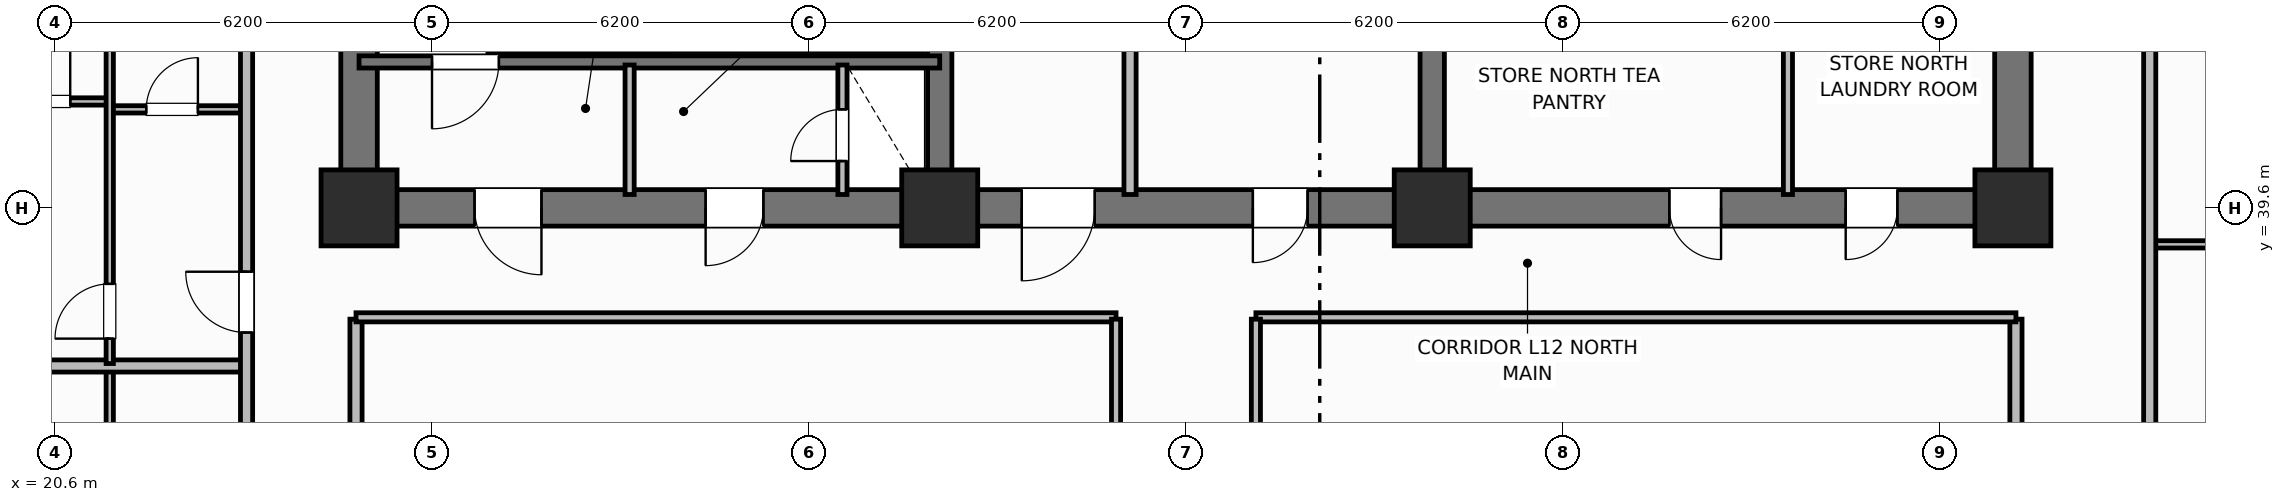
"""IFC4 building model, lengths in metres.
Left out: names, types, materials, properties, quantities, classifications, styles, units other than length and angle.
Written with IfcOpenShell. Run it as: python <this file> out.ifc"""

import sys

from ifc_helpers import new_model, si_unit, direction, frame, frame_2d, origin, origin_2d, place, context, subcontext, project, spatial, rectangle, extrude, element, fill, save


model = new_model("IFC4")
c1 = context("Model", 3, precision=1e-05, world=origin(), true_north=direction((0.0, 1.0)))
c2 = subcontext(c1, "Body", "Model", "MODEL_VIEW")
j1 = project(units=[si_unit("LENGTHUNIT", "METRE"), si_unit("PLANEANGLEUNIT", "RADIAN")], contexts=[c1])
p1 = place(None, origin())
s1 = spatial("IfcSite", under=j1, at=p1, CompositionType="ELEMENT")
p2 = place(p1, origin())
s2 = spatial("IfcBuilding", under=s1, at=p2, CompositionType="ELEMENT")
p3 = place(p2, frame((0.0, 0.0, 51.0)))
s3 = spatial("IfcBuildingStorey", under=s2, at=p3, CompositionType="ELEMENT", Elevation=51.0)
for number, where, z_axis, x_axis in (
    (1, (25.6, 39.9, 0.0), (0.0, 0.0, 1.0), (0.0, 1.0, 0.0)),
    (2, (52.8, 39.9, 0.0), (0.0, 0.0, 1.0), (0.0, 1.0, 0.0)),
):
    element("IfcWall", number, at=place(p3, frame(where, z_axis=z_axis, x_axis=x_axis)), inside=s3, PredefinedType="SHEAR", context=c2, shape_type="SweptSolid", body=[
        extrude(rectangle(XDim=5.6, YDim=0.6, at=frame_2d((2.8, 0.0))), origin(), (0.0, 0.0, 1.0), 3.7),
    ])
p4 = place(p3, frame((52.8, 39.6, 0.0), z_axis=(0.0, 0.0, 1.0), x_axis=(-1.0, 0.0, 0.0)))
e3 = element("IfcWall", 3, at=p4, inside=s3, PredefinedType="SHEAR", context=c2, shape_type="SweptSolid", body=[
    extrude(rectangle(XDim=27.2, YDim=0.6, at=frame_2d((13.6, 0.0))), origin(), (0.0, 0.0, 1.0), 3.7),
])
p5 = place(p4, frame((24.2, 0.0, 0.0)))
e4 = element("IfcOpeningElement", 4, at=p5, cuts=e3, PredefinedType="OPENING", context=c2, shape_type="SweptSolid", body=[
    extrude(rectangle(XDim=1.1, YDim=2.15, at=frame_2d((0.55, 1.075))), frame((0.0, 0.31, 0.0), z_axis=(0.0, -1.0, 0.0), x_axis=(1.0, 0.0, 0.0)), (0.0, 0.0, 1.0), 0.62),
])
p6 = place(p4, frame((20.55, 0.0, 0.0)))
e5 = element("IfcOpeningElement", 5, at=p6, cuts=e3, PredefinedType="OPENING", context=c2, shape_type="SweptSolid", body=[
    extrude(rectangle(XDim=0.95, YDim=2.1, at=frame_2d((0.475, 1.05))), frame((0.0, 0.31, 0.0), z_axis=(0.0, -1.0, 0.0), x_axis=(1.0, 0.0, 0.0)), (0.0, 0.0, 1.0), 0.62),
])
p7 = place(p4, frame((15.1, 0.0, 0.0)))
e6 = element("IfcOpeningElement", 6, at=p7, cuts=e3, PredefinedType="OPENING", context=c2, shape_type="SweptSolid", body=[
    extrude(rectangle(XDim=1.2, YDim=2.15, at=frame_2d((0.6, 1.075))), frame((0.0, 0.31, 0.0), z_axis=(0.0, -1.0, 0.0), x_axis=(1.0, 0.0, 0.0)), (0.0, 0.0, 1.0), 0.62),
])
p8 = place(p4, frame((11.6, 0.0, 0.0)))
e7 = element("IfcOpeningElement", 7, at=p8, cuts=e3, PredefinedType="OPENING", context=c2, shape_type="SweptSolid", body=[
    extrude(rectangle(XDim=0.9, YDim=2.1, at=frame_2d((0.45, 1.05))), frame((0.0, 0.31, 0.0), z_axis=(0.0, -1.0, 0.0), x_axis=(1.0, 0.0, 0.0)), (0.0, 0.0, 1.0), 0.62),
])
p9 = place(p4, frame((4.8, 0.0, 0.0)))
e8 = element("IfcOpeningElement", 8, at=p9, cuts=e3, PredefinedType="OPENING", context=c2, shape_type="SweptSolid", body=[
    extrude(rectangle(XDim=0.85, YDim=2.1, at=frame_2d((0.425, 1.05))), frame((0.0, 0.31, 0.0), z_axis=(0.0, -1.0, 0.0), x_axis=(1.0, 0.0, 0.0)), (0.0, 0.0, 1.0), 0.62),
])
p10 = place(p4, frame((1.9, 0.0, 0.0)))
e9 = element("IfcOpeningElement", 9, at=p10, cuts=e3, PredefinedType="OPENING", context=c2, shape_type="SweptSolid", body=[
    extrude(rectangle(XDim=0.85, YDim=2.1, at=frame_2d((0.425, 1.05))), frame((0.0, 0.31, 0.0), z_axis=(0.0, -1.0, 0.0), x_axis=(1.0, 0.0, 0.0)), (0.0, 0.0, 1.0), 0.62),
])
for number, where, z_axis, x_axis in (
    (10, (35.15, 39.9, 0.0), (0.0, 0.0, 1.0), (0.0, 1.0, 0.0)),
    (11, (43.25, 39.9, 0.0), (0.0, 0.0, 1.0), (0.0, 1.0, 0.0)),
):
    element("IfcWall", number, at=place(p3, frame(where, z_axis=z_axis, x_axis=x_axis)), inside=s3, PredefinedType="SHEAR", context=c2, shape_type="SweptSolid", body=[
        extrude(rectangle(XDim=5.6, YDim=0.4, at=frame_2d((2.8, 0.0))), origin(), (0.0, 0.0, 1.0), 3.7),
    ])
for number, where, z_axis, x_axis in (
    (12, (25.6, 39.6, 0.0), (0.0, 0.0, 1.0), (1.0, 0.0, 0.0)),
    (13, (35.15, 39.6, 0.0), (0.0, 0.0, 1.0), (1.0, 0.0, 0.0)),
    (14, (43.25, 39.6, 0.0), (0.0, 0.0, 1.0), (1.0, 0.0, 0.0)),
    (15, (52.8, 39.6, 0.0), (0.0, 0.0, 1.0), (1.0, 0.0, 0.0)),
):
    element("IfcColumn", number, at=place(p3, frame(where, z_axis=z_axis, x_axis=x_axis)), inside=s3, PredefinedType="COLUMN", context=c2, shape_type="SweptSolid", body=[
        extrude(rectangle(XDim=1.25, YDim=1.25, at=origin_2d()), origin(), (0.0, 0.0, 1.0), 3.7),
    ])
p11 = place(p3, frame((35.15, 42.0, 0.0), z_axis=(0.0, 0.0, 1.0), x_axis=(-1.0, 0.0, 0.0)))
e16 = element("IfcWall", 16, at=p11, inside=s3, PredefinedType="SHEAR", context=c2, shape_type="SweptSolid", body=[
    extrude(rectangle(XDim=9.55, YDim=0.2, at=frame_2d((4.775, 0.0))), origin(), (0.0, 0.0, 1.0), 3.7),
])
p12 = place(p11, frame((7.25, 0.0, 0.0)))
e17 = element("IfcOpeningElement", 17, at=p12, cuts=e16, PredefinedType="OPENING", context=c2, shape_type="SweptSolid", body=[
    extrude(rectangle(XDim=1.1, YDim=2.15, at=frame_2d((0.55, 1.075))), frame((0.0, 0.11, 0.0), z_axis=(0.0, -1.0, 0.0), x_axis=(1.0, 0.0, 0.0)), (0.0, 0.0, 1.0), 0.22),
])
p13 = place(p3, frame((33.55, 39.82, 0.0), z_axis=(0.0, 0.0, 1.0), x_axis=(0.0, 1.0, 0.0)))
e18 = element("IfcWall", 18, at=p13, inside=s3, PredefinedType="PARTITIONING", context=c2, shape_type="SweptSolid", body=[
    extrude(rectangle(XDim=2.13, YDim=0.15, at=frame_2d((1.065, 0.0))), origin(), (0.0, 0.0, 1.0), 2.53),
])
p14 = place(p13, frame((0.55, 0.0, 0.0)))
e19 = element("IfcOpeningElement", 19, at=p14, cuts=e18, PredefinedType="OPENING", context=c2, shape_type="SweptSolid", body=[
    extrude(rectangle(XDim=0.85, YDim=2.05, at=frame_2d((0.425, 1.025))), frame((0.0, 0.085, 0.0), z_axis=(0.0, -1.0, 0.0), x_axis=(1.0, 0.0, 0.0)), (0.0, 0.0, 1.0), 0.17),
])
p15 = place(p3, frame((30.05, 39.82, 0.0), z_axis=(0.0, 0.0, 1.0), x_axis=(0.0, 1.0, 0.0)))
e20 = element("IfcWall", 20, at=p15, inside=s3, PredefinedType="PARTITIONING", context=c2, shape_type="SweptSolid", body=[
    extrude(rectangle(XDim=2.13, YDim=0.15, at=frame_2d((1.065, 0.0))), origin(), (0.0, 0.0, 1.0), 2.53),
])
p16 = place(p3, frame((38.28, 39.82, 0.0), z_axis=(0.0, 0.0, 1.0), x_axis=(0.0, 1.0, 0.0)))
e21 = element("IfcWall", 21, at=p16, inside=s3, PredefinedType="PARTITIONING", context=c2, shape_type="SweptSolid", body=[
    extrude(rectangle(XDim=2.73, YDim=0.2, at=frame_2d((1.365, 0.0))), origin(), (0.0, 0.0, 1.0), 2.53),
])
p17 = place(p3, frame((49.1, 39.82, 0.0), z_axis=(0.0, 0.0, 1.0), x_axis=(0.0, 1.0, 0.0)))
e22 = element("IfcWall", 22, at=p17, inside=s3, PredefinedType="PARTITIONING", context=c2, shape_type="SweptSolid", body=[
    extrude(rectangle(XDim=2.73, YDim=0.15, at=frame_2d((1.365, 0.0))), origin(), (0.0, 0.0, 1.0), 2.53),
])
for number, where, z_axis, x_axis in (
    (23, (25.55, 18.63, 0.0), (0.0, 0.0, 1.0), (0.0, 1.0, 0.0)),
    (24, (52.85, 18.63, 0.0), (0.0, 0.0, 1.0), (0.0, 1.0, 0.0)),
):
    element("IfcWall", number, at=place(p3, frame(where, z_axis=z_axis, x_axis=x_axis)), inside=s3, PredefinedType="PARTITIONING", context=c2, shape_type="SweptSolid", body=[
        extrude(rectangle(XDim=19.14, YDim=0.2, at=frame_2d((9.57, 0.0))), origin(), (0.0, 0.0, 1.0), 2.53),
    ])
for number, where, z_axis, x_axis in (
    (25, (25.55, 37.8, 0.0), (0.0, 0.0, 1.0), (1.0, 0.0, 0.0)),
    (26, (40.35, 37.8, 0.0), (0.0, 0.0, 1.0), (1.0, 0.0, 0.0)),
):
    element("IfcWall", number, at=place(p3, frame(where, z_axis=z_axis, x_axis=x_axis)), inside=s3, PredefinedType="PARTITIONING", context=c2, shape_type="SweptSolid", body=[
        extrude(rectangle(XDim=12.5, YDim=0.15, at=frame_2d((6.25, 0.0))), origin(), (0.0, 0.0, 1.0), 2.53),
    ])
p18 = place(p3, frame((38.05, 18.63, 0.0), z_axis=(0.0, 0.0, 1.0), x_axis=(0.0, 1.0, 0.0)))
e27 = element("IfcWall", 27, at=p18, inside=s3, PredefinedType="PARTITIONING", context=c2, shape_type="SweptSolid", body=[
    extrude(rectangle(XDim=19.14, YDim=0.15, at=frame_2d((9.57, 0.0))), origin(), (0.0, 0.0, 1.0), 2.53),
])
p19 = place(p18, frame((2.2, 0.0, 0.0)))
e28 = element("IfcOpeningElement", 28, at=p19, cuts=e27, PredefinedType="OPENING", context=c2, shape_type="SweptSolid", body=[
    extrude(rectangle(XDim=1.0, YDim=2.15, at=frame_2d((0.5, 1.075))), frame((0.0, 0.085, 0.0), z_axis=(0.0, -1.0, 0.0), x_axis=(1.0, 0.0, 0.0)), (0.0, 0.0, 1.0), 0.17),
])
p20 = place(p18, frame((10.604, 0.0, 0.0)))
e29 = element("IfcOpeningElement", 29, at=p20, cuts=e27, PredefinedType="OPENING", context=c2, shape_type="SweptSolid", body=[
    extrude(rectangle(XDim=1.0, YDim=2.15, at=frame_2d((0.5, 1.075))), frame((0.0, 0.085, 0.0), z_axis=(0.0, -1.0, 0.0), x_axis=(1.0, 0.0, 0.0)), (0.0, 0.0, 1.0), 0.17),
])
p21 = place(p3, frame((40.35, 18.63, 0.0), z_axis=(0.0, 0.0, 1.0), x_axis=(0.0, 1.0, 0.0)))
e30 = element("IfcWall", 30, at=p21, inside=s3, PredefinedType="PARTITIONING", context=c2, shape_type="SweptSolid", body=[
    extrude(rectangle(XDim=19.14, YDim=0.15, at=frame_2d((9.57, 0.0))), origin(), (0.0, 0.0, 1.0), 2.53),
])
p22 = place(p21, frame((2.2, 0.0, 0.0)))
e31 = element("IfcOpeningElement", 31, at=p22, cuts=e30, PredefinedType="OPENING", context=c2, shape_type="SweptSolid", body=[
    extrude(rectangle(XDim=1.0, YDim=2.15, at=frame_2d((0.5, 1.075))), frame((0.0, 0.085, 0.0), z_axis=(0.0, -1.0, 0.0), x_axis=(1.0, 0.0, 0.0)), (0.0, 0.0, 1.0), 0.17),
])
p23 = place(p21, frame((10.604, 0.0, 0.0)))
e32 = element("IfcOpeningElement", 32, at=p23, cuts=e30, PredefinedType="OPENING", context=c2, shape_type="SweptSolid", body=[
    extrude(rectangle(XDim=0.9, YDim=2.1, at=frame_2d((0.45, 1.05))), frame((0.0, 0.085, 0.0), z_axis=(0.0, -1.0, 0.0), x_axis=(1.0, 0.0, 0.0)), (0.0, 0.0, 1.0), 0.17),
])
p24 = place(p3, frame((21.5, 26.64, 0.0), z_axis=(0.0, 0.0, 1.0), x_axis=(0.0, 1.0, 0.0)))
e33 = element("IfcWall", 33, at=p24, inside=s3, PredefinedType="PARTITIONING", context=c2, shape_type="SweptSolid", body=[
    extrude(rectangle(XDim=10.32, YDim=0.12, at=frame_2d((5.16, 0.0))), origin(), (0.0, 0.0, 1.0), 2.53),
])
p25 = place(p24, frame((2.81, 0.0, 0.0)))
e34 = element("IfcOpeningElement", 34, at=p25, cuts=e33, PredefinedType="OPENING", context=c2, shape_type="SweptSolid", body=[
    extrude(rectangle(XDim=0.9, YDim=2.1, at=frame_2d((0.45, 1.05))), frame((0.0, 0.07, 0.0), z_axis=(0.0, -1.0, 0.0), x_axis=(1.0, 0.0, 0.0)), (0.0, 0.0, 1.0), 0.14),
])
p26 = place(p3, frame((14.57, 37.0, 0.0), z_axis=(0.0, 0.0, 1.0), x_axis=(1.0, 0.0, 0.0)))
e35 = element("IfcWall", 35, at=p26, inside=s3, PredefinedType="PARTITIONING", context=c2, shape_type="SweptSolid", body=[
    extrude(rectangle(XDim=9.18, YDim=0.2, at=frame_2d((4.59, 0.0))), origin(), (0.0, 0.0, 1.0), 2.53),
])
p27 = place(p3, frame((21.5, 41.22, 0.0), z_axis=(0.0, 0.0, 1.0), x_axis=(1.0, 0.0, 0.0)))
e36 = element("IfcWall", 36, at=p27, inside=s3, PredefinedType="PARTITIONING", context=c2, shape_type="SweptSolid", body=[
    extrude(rectangle(XDim=2.25, YDim=0.12, at=frame_2d((1.125, 0.0))), origin(), (0.0, 0.0, 1.0), 2.53),
])
p28 = place(p27, frame((0.6, 0.0, 0.0)))
e37 = element("IfcOpeningElement", 37, at=p28, cuts=e36, PredefinedType="OPENING", context=c2, shape_type="SweptSolid", body=[
    extrude(rectangle(XDim=0.85, YDim=2.1, at=frame_2d((0.425, 1.05))), frame((0.0, 0.07, 0.0), z_axis=(0.0, -1.0, 0.0), x_axis=(1.0, 0.0, 0.0)), (0.0, 0.0, 1.0), 0.14),
])
p29 = place(p3, frame((14.57, 41.35, 0.0), z_axis=(0.0, 0.0, 1.0), x_axis=(1.0, 0.0, 0.0)))
e38 = element("IfcWall", 38, at=p29, inside=s3, PredefinedType="PARTITIONING", context=c2, shape_type="SweptSolid", body=[
    extrude(rectangle(XDim=6.93, YDim=0.12, at=frame_2d((3.465, 0.0))), origin(), (0.0, 0.0, 1.0), 2.53),
])
p30 = place(p29, frame((5.38, 0.0, 0.0)))
e39 = element("IfcOpeningElement", 39, at=p30, cuts=e38, PredefinedType="OPENING", context=c2, shape_type="SweptSolid", body=[
    extrude(rectangle(XDim=0.9, YDim=2.1, at=frame_2d((0.45, 1.05))), frame((0.0, 0.07, 0.0), z_axis=(0.0, -1.0, 0.0), x_axis=(1.0, 0.0, 0.0)), (0.0, 0.0, 1.0), 0.14),
])
p31 = place(p3, frame((21.5, 37.04, 0.0), z_axis=(0.0, 0.0, 1.0), x_axis=(0.0, 1.0, 0.0)))
e40 = element("IfcWall", 40, at=p31, inside=s3, PredefinedType="PARTITIONING", context=c2, shape_type="SweptSolid", body=[
    extrude(rectangle(XDim=8.72, YDim=0.12, at=frame_2d((4.36, 0.0))), origin(), (0.0, 0.0, 1.0), 2.53),
])
p32 = place(p31, frame((0.41, 0.0, 0.0)))
e41 = element("IfcOpeningElement", 41, at=p32, cuts=e40, PredefinedType="OPENING", context=c2, shape_type="SweptSolid", body=[
    extrude(rectangle(XDim=0.9, YDim=2.1, at=frame_2d((0.45, 1.05))), frame((0.0, 0.07, 0.0), z_axis=(0.0, -1.0, 0.0), x_axis=(1.0, 0.0, 0.0)), (0.0, 0.0, 1.0), 0.14),
])
p33 = place(p3, frame((23.75, 10.6, 0.0), z_axis=(0.0, 0.0, 1.0), x_axis=(0.0, 1.0, 0.0)))
e42 = element("IfcWall", 42, at=p33, inside=s3, PredefinedType="PARTITIONING", context=c2, shape_type="SweptSolid", body=[
    extrude(rectangle(XDim=35.2, YDim=0.2, at=frame_2d((17.6, 0.0))), origin(), (0.0, 0.0, 1.0), 2.53),
])
p34 = place(p33, frame((2.65, 0.0, 0.0)))
e43 = element("IfcOpeningElement", 43, at=p34, cuts=e42, PredefinedType="OPENING", context=c2, shape_type="SweptSolid", body=[
    extrude(rectangle(XDim=1.0, YDim=2.15, at=frame_2d((0.5, 1.075))), frame((0.0, 0.11, 0.0), z_axis=(0.0, -1.0, 0.0), x_axis=(1.0, 0.0, 0.0)), (0.0, 0.0, 1.0), 0.22),
])
p35 = place(p33, frame((10.81, 0.0, 0.0)))
e44 = element("IfcOpeningElement", 44, at=p35, cuts=e42, PredefinedType="OPENING", context=c2, shape_type="SweptSolid", body=[
    extrude(rectangle(XDim=1.0, YDim=2.15, at=frame_2d((0.5, 1.075))), frame((0.0, 0.11, 0.0), z_axis=(0.0, -1.0, 0.0), x_axis=(1.0, 0.0, 0.0)), (0.0, 0.0, 1.0), 0.22),
])
p36 = place(p33, frame((19.54, 0.0, 0.0)))
e45 = element("IfcOpeningElement", 45, at=p36, cuts=e42, PredefinedType="OPENING", context=c2, shape_type="SweptSolid", body=[
    extrude(rectangle(XDim=1.0, YDim=2.15, at=frame_2d((0.5, 1.075))), frame((0.0, 0.11, 0.0), z_axis=(0.0, -1.0, 0.0), x_axis=(1.0, 0.0, 0.0)), (0.0, 0.0, 1.0), 0.22),
])
p37 = place(p33, frame((26.95, 0.0, 0.0)))
e46 = element("IfcOpeningElement", 46, at=p37, cuts=e42, PredefinedType="OPENING", context=c2, shape_type="SweptSolid", body=[
    extrude(rectangle(XDim=1.0, YDim=2.15, at=frame_2d((0.5, 1.075))), frame((0.0, 0.11, 0.0), z_axis=(0.0, -1.0, 0.0), x_axis=(1.0, 0.0, 0.0)), (0.0, 0.0, 1.0), 0.22),
])
p38 = place(p3, frame((55.05, 39.0, 0.0), z_axis=(0.0, 0.0, 1.0), x_axis=(1.0, 0.0, 0.0)))
e47 = element("IfcWall", 47, at=p38, inside=s3, PredefinedType="PARTITIONING", context=c2, shape_type="SweptSolid", body=[
    extrude(rectangle(XDim=2.25, YDim=0.12, at=frame_2d((1.125, 0.0))), origin(), (0.0, 0.0, 1.0), 2.53),
])
p39 = place(p3, frame((55.05, 10.6, 0.0), z_axis=(0.0, 0.0, 1.0), x_axis=(0.0, 1.0, 0.0)))
e48 = element("IfcWall", 48, at=p39, inside=s3, PredefinedType="PARTITIONING", context=c2, shape_type="SweptSolid", body=[
    extrude(rectangle(XDim=35.2, YDim=0.2, at=frame_2d((17.6, 0.0))), origin(), (0.0, 0.0, 1.0), 2.53),
])
p40 = place(p39, frame((2.65, 0.0, 0.0)))
e49 = element("IfcOpeningElement", 49, at=p40, cuts=e48, PredefinedType="OPENING", context=c2, shape_type="SweptSolid", body=[
    extrude(rectangle(XDim=1.0, YDim=2.15, at=frame_2d((0.5, 1.075))), frame((0.0, 0.11, 0.0), z_axis=(0.0, -1.0, 0.0), x_axis=(1.0, 0.0, 0.0)), (0.0, 0.0, 1.0), 0.22),
])
p41 = place(p39, frame((22.75, 0.0, 0.0)))
e50 = element("IfcOpeningElement", 50, at=p41, cuts=e48, PredefinedType="OPENING", context=c2, shape_type="SweptSolid", body=[
    extrude(rectangle(XDim=1.0, YDim=2.15, at=frame_2d((0.5, 1.075))), frame((0.0, 0.11, 0.0), z_axis=(0.0, -1.0, 0.0), x_axis=(1.0, 0.0, 0.0)), (0.0, 0.0, 1.0), 0.22),
])
p42 = place(p12, origin())
e51 = element("IfcDoor", 51, at=p42, inside=s3, OperationType="SINGLE_SWING_RIGHT", PredefinedType="DOOR", context=c2, shape_type="SweptSolid", body=[
    extrude(rectangle(XDim=1.1, YDim=2.15, at=frame_2d((0.55, 1.075))), frame((0.0, 0.025, 0.0), z_axis=(0.0, -1.0, 0.0), x_axis=(1.0, 0.0, 0.0)), (0.0, 0.0, 1.0), 0.05),
])
fill(e17, e51)
p43 = place(p14, origin())
e52 = element("IfcDoor", 52, at=p43, inside=s3, OperationType="SINGLE_SWING_LEFT", PredefinedType="TRAPDOOR", context=c2, shape_type="SweptSolid", body=[
    extrude(rectangle(XDim=0.85, YDim=2.05, at=frame_2d((0.425, 1.025))), frame((0.0, 0.025, 0.0), z_axis=(0.0, -1.0, 0.0), x_axis=(1.0, 0.0, 0.0)), (0.0, 0.0, 1.0), 0.05),
])
fill(e19, e52)
p44 = place(p28, origin())
e53 = element("IfcDoor", 53, at=p44, inside=s3, OperationType="SINGLE_SWING_RIGHT", PredefinedType="DOOR", context=c2, shape_type="SweptSolid", body=[
    extrude(rectangle(XDim=0.85, YDim=2.1, at=frame_2d((0.425, 1.05))), frame((0.0, 0.025, 0.0), z_axis=(0.0, -1.0, 0.0), x_axis=(1.0, 0.0, 0.0)), (0.0, 0.0, 1.0), 0.05),
])
fill(e37, e53)
p45 = place(p30, origin())
e54 = element("IfcDoor", 54, at=p45, inside=s3, OperationType="SINGLE_SWING_RIGHT", PredefinedType="DOOR", context=c2, shape_type="SweptSolid", body=[
    extrude(rectangle(XDim=0.9, YDim=2.1, at=frame_2d((0.45, 1.05))), frame((0.0, 0.025, 0.0), z_axis=(0.0, -1.0, 0.0), x_axis=(1.0, 0.0, 0.0)), (0.0, 0.0, 1.0), 0.05),
])
fill(e39, e54)
p46 = place(p32, origin())
e55 = element("IfcDoor", 55, at=p46, inside=s3, OperationType="SINGLE_SWING_LEFT", PredefinedType="DOOR", context=c2, shape_type="SweptSolid", body=[
    extrude(rectangle(XDim=0.9, YDim=2.1, at=frame_2d((0.45, 1.05))), frame((0.0, 0.025, 0.0), z_axis=(0.0, -1.0, 0.0), x_axis=(1.0, 0.0, 0.0)), (0.0, 0.0, 1.0), 0.05),
])
fill(e41, e55)
p47 = place(p37, origin())
e56 = element("IfcDoor", 56, at=p47, inside=s3, OperationType="SINGLE_SWING_RIGHT", PredefinedType="DOOR", context=c2, shape_type="SweptSolid", body=[
    extrude(rectangle(XDim=1.0, YDim=2.15, at=frame_2d((0.5, 1.075))), frame((0.0, 0.025, 0.0), z_axis=(0.0, -1.0, 0.0), x_axis=(1.0, 0.0, 0.0)), (0.0, 0.0, 1.0), 0.05),
])
fill(e46, e56)
p48 = place(p5, origin())
e57 = element("IfcDoor", 57, at=p48, inside=s3, OperationType="SINGLE_SWING_LEFT", PredefinedType="DOOR", context=c2, shape_type="SweptSolid", body=[
    extrude(rectangle(XDim=1.1, YDim=2.15, at=frame_2d((0.55, 1.075))), frame((0.0, 0.025, 0.0), z_axis=(0.0, -1.0, 0.0), x_axis=(1.0, 0.0, 0.0)), (0.0, 0.0, 1.0), 0.05),
])
fill(e4, e57)
p49 = place(p6, origin())
e58 = element("IfcDoor", 58, at=p49, inside=s3, OperationType="SINGLE_SWING_RIGHT", PredefinedType="DOOR", context=c2, shape_type="SweptSolid", body=[
    extrude(rectangle(XDim=0.95, YDim=2.1, at=frame_2d((0.475, 1.05))), frame((0.0, 0.025, 0.0), z_axis=(0.0, -1.0, 0.0), x_axis=(1.0, 0.0, 0.0)), (0.0, 0.0, 1.0), 0.05),
])
fill(e5, e58)
p50 = place(p7, origin())
e59 = element("IfcDoor", 59, at=p50, inside=s3, OperationType="SINGLE_SWING_RIGHT", PredefinedType="DOOR", context=c2, shape_type="SweptSolid", body=[
    extrude(rectangle(XDim=1.2, YDim=2.15, at=frame_2d((0.6, 1.075))), frame((0.0, 0.025, 0.0), z_axis=(0.0, -1.0, 0.0), x_axis=(1.0, 0.0, 0.0)), (0.0, 0.0, 1.0), 0.05),
])
fill(e6, e59)
p51 = place(p8, origin())
e60 = element("IfcDoor", 60, at=p51, inside=s3, OperationType="SINGLE_SWING_RIGHT", PredefinedType="DOOR", context=c2, shape_type="SweptSolid", body=[
    extrude(rectangle(XDim=0.9, YDim=2.1, at=frame_2d((0.45, 1.05))), frame((0.0, 0.025, 0.0), z_axis=(0.0, -1.0, 0.0), x_axis=(1.0, 0.0, 0.0)), (0.0, 0.0, 1.0), 0.05),
])
fill(e7, e60)
p52 = place(p9, origin())
e61 = element("IfcDoor", 61, at=p52, inside=s3, OperationType="SINGLE_SWING_LEFT", PredefinedType="DOOR", context=c2, shape_type="SweptSolid", body=[
    extrude(rectangle(XDim=0.85, YDim=2.1, at=frame_2d((0.425, 1.05))), frame((0.0, 0.025, 0.0), z_axis=(0.0, -1.0, 0.0), x_axis=(1.0, 0.0, 0.0)), (0.0, 0.0, 1.0), 0.05),
])
fill(e8, e61)
p53 = place(p10, origin())
e62 = element("IfcDoor", 62, at=p53, inside=s3, OperationType="SINGLE_SWING_RIGHT", PredefinedType="DOOR", context=c2, shape_type="SweptSolid", body=[
    extrude(rectangle(XDim=0.85, YDim=2.1, at=frame_2d((0.425, 1.05))), frame((0.0, 0.025, 0.0), z_axis=(0.0, -1.0, 0.0), x_axis=(1.0, 0.0, 0.0)), (0.0, 0.0, 1.0), 0.05),
])
fill(e9, e62)
save(model, sys.argv[1])
